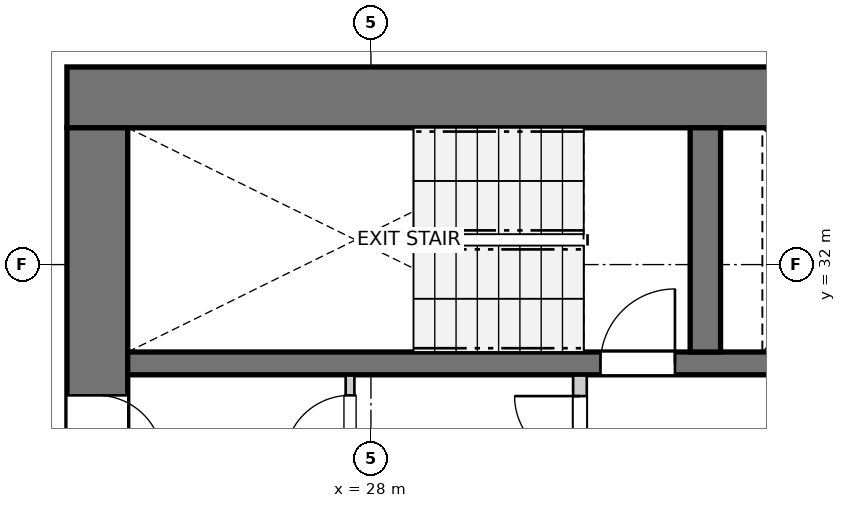
"""IFC4 building model, lengths in metres.
Left out: names, types, materials, properties, quantities, classifications, styles, units other than length and angle.
Written with IfcOpenShell. Run it as: python <this file> out.ifc"""

import sys

from ifc_helpers import new_model, si_unit, direction, frame, frame_2d, origin, place, context, subcontext, project, spatial, rectangle, extrude, source, transform, mapped, element, fill, save


model = new_model("IFC4")
c1 = context("Model", 3, precision=1e-05, world=origin(), true_north=direction((0.0, 1.0)))
c2 = subcontext(c1, "Body", "Model", "MODEL_VIEW")
j1 = project(units=[si_unit("LENGTHUNIT", "METRE"), si_unit("PLANEANGLEUNIT", "RADIAN")], contexts=[c1])
p1 = place(None, origin())
s1 = spatial("IfcSite", under=j1, at=p1, CompositionType="ELEMENT")
p2 = place(p1, origin())
s2 = spatial("IfcBuilding", under=s1, at=p2, CompositionType="ELEMENT")
p3 = place(p2, frame((0.0, 0.0, 23.8)))
s3 = spatial("IfcBuildingStorey", under=s2, at=p3, CompositionType="ELEMENT", Elevation=23.8)
p4 = place(p3, frame((36.7, 34.2, 0.0), z_axis=(0.0, 0.0, 1.0), x_axis=(-1.0, 0.0, 0.0)))
e1 = element("IfcWall", 1, at=p4, inside=s3, PredefinedType="SHEAR", context=c2, shape_type="SweptSolid", body=[
    extrude(rectangle(XDim=12.7, YDim=0.8, at=frame_2d((6.35, 0.0))), origin(), (0.0, 0.0, 1.0), 2.935),
])
p5 = place(p3, frame((24.4, 33.8, 0.0), z_axis=(0.0, 0.0, 1.0), x_axis=(0.0, -1.0, 0.0)))
e2 = element("IfcWall", 2, at=p5, inside=s3, PredefinedType="SHEAR", context=c2, shape_type="SweptSolid", body=[
    extrude(rectangle(XDim=15.6, YDim=0.8, at=frame_2d((7.8, 0.0))), origin(), (0.0, 0.0, 1.0), 2.935),
])
p6 = place(p5, frame((7.05, 0.0, 0.0)))
e3 = element("IfcOpeningElement", 3, at=p6, cuts=e2, PredefinedType="OPENING", context=c2, shape_type="SweptSolid", body=[
    extrude(rectangle(XDim=1.5, YDim=2.15, at=frame_2d((0.75, 1.075))), frame((0.0, 0.41, 0.0), z_axis=(0.0, -1.0, 0.0), x_axis=(1.0, 0.0, 0.0)), (0.0, 0.0, 1.0), 0.82),
])
p7 = place(p5, frame((3.52, 0.0, 0.0)))
e4 = element("IfcOpeningElement", 4, at=p7, cuts=e2, PredefinedType="OPENING", context=c2, shape_type="SweptSolid", body=[
    extrude(rectangle(XDim=0.86, YDim=2.05, at=frame_2d((0.43, 1.025))), frame((0.0, 0.41, 0.0), z_axis=(0.0, -1.0, 0.0), x_axis=(1.0, 0.0, 0.0)), (0.0, 0.0, 1.0), 0.82),
])
p8 = place(p5, frame((11.22, 0.0, 0.0)))
e5 = element("IfcOpeningElement", 5, at=p8, cuts=e2, PredefinedType="OPENING", context=c2, shape_type="SweptSolid", body=[
    extrude(rectangle(XDim=0.86, YDim=2.05, at=frame_2d((0.43, 1.025))), frame((0.0, 0.41, 0.0), z_axis=(0.0, -1.0, 0.0), x_axis=(1.0, 0.0, 0.0)), (0.0, 0.0, 1.0), 0.82),
])
p9 = place(p3, frame((24.8, 30.7, 0.0), z_axis=(0.0, 0.0, 1.0), x_axis=(1.0, 0.0, 0.0)))
e6 = element("IfcWall", 6, at=p9, inside=s3, PredefinedType="SHEAR", context=c2, shape_type="SweptSolid", body=[
    extrude(rectangle(XDim=11.1, YDim=0.3, at=frame_2d((5.55, 0.0))), origin(), (0.0, 0.0, 1.0), 2.935),
])
p10 = place(p9, frame((6.22, 0.0, 0.0)))
e7 = element("IfcOpeningElement", 7, at=p10, cuts=e6, PredefinedType="OPENING", context=c2, shape_type="SweptSolid", body=[
    extrude(rectangle(XDim=0.98, YDim=2.15, at=frame_2d((0.49, 1.075))), frame((0.0, 0.16, 0.0), z_axis=(0.0, -1.0, 0.0), x_axis=(1.0, 0.0, 0.0)), (0.0, 0.0, 1.0), 0.32),
])
p11 = place(p9, frame((9.15, 0.0, 0.0)))
e8 = element("IfcOpeningElement", 8, at=p11, cuts=e6, PredefinedType="OPENING", context=c2, shape_type="SweptSolid", body=[
    extrude(rectangle(XDim=1.15, YDim=2.15, at=frame_2d((0.575, 1.075))), frame((0.0, 0.16, 0.0), z_axis=(0.0, -1.0, 0.0), x_axis=(1.0, 0.0, 0.0)), (0.0, 0.0, 1.0), 0.32),
])
p12 = place(p3, frame((32.4, 30.85, 0.0), z_axis=(0.0, 0.0, 1.0), x_axis=(0.0, 1.0, 0.0)))
e9 = element("IfcWall", 9, at=p12, inside=s3, PredefinedType="SHEAR", context=c2, shape_type="SweptSolid", body=[
    extrude(rectangle(XDim=2.95, YDim=0.4, at=frame_2d((1.475, 0.0))), origin(), (0.0, 0.0, 1.0), 2.935),
])
p13 = place(p3, frame((30.75, 27.43, 0.0), z_axis=(0.0, 0.0, 1.0), x_axis=(0.0, 1.0, 0.0)))
e10 = element("IfcWall", 10, at=p13, inside=s3, PredefinedType="PARTITIONING", context=c2, shape_type="SweptSolid", body=[
    extrude(rectangle(XDim=3.11, YDim=0.18, at=frame_2d((1.555, 0.0))), origin(), (0.0, 0.0, 1.0), 2.935),
])
p14 = place(p13, frame((1.98, 0.0, 0.0)))
e11 = element("IfcOpeningElement", 11, at=p14, cuts=e10, PredefinedType="OPENING", context=c2, shape_type="SweptSolid", body=[
    extrude(rectangle(XDim=0.86, YDim=2.05, at=frame_2d((0.43, 1.025))), frame((0.0, 0.1, 0.0), z_axis=(0.0, -1.0, 0.0), x_axis=(1.0, 0.0, 0.0)), (0.0, 0.0, 1.0), 0.2),
])
p15 = place(p3, frame((27.725, 29.16, 0.0), z_axis=(0.0, 0.0, 1.0), x_axis=(0.0, 1.0, 0.0)))
e12 = element("IfcWall", 12, at=p15, inside=s3, PredefinedType="PARTITIONING", context=c2, shape_type="SweptSolid", body=[
    extrude(rectangle(XDim=1.38, YDim=0.115, at=frame_2d((0.69, 0.0))), origin(), (0.0, 0.0, 1.0), 2.935),
])
p16 = place(p15, frame((0.26, 0.0, 0.0)))
e13 = element("IfcOpeningElement", 13, at=p16, cuts=e12, PredefinedType="OPENING", context=c2, shape_type="SweptSolid", body=[
    extrude(rectangle(XDim=0.86, YDim=2.05, at=frame_2d((0.43, 1.025))), frame((0.0, 0.067, 0.0), z_axis=(0.0, -1.0, 0.0), x_axis=(1.0, 0.0, 0.0)), (0.0, 0.0, 1.0), 0.135),
])
m1 = source(origin(), c2, "Body", "SweptSolid", [
    extrude(rectangle(XDim=0.98, YDim=2.15, at=frame_2d((0.49, 1.075))), frame((0.0, 0.025, 0.0), z_axis=(0.0, -1.0, 0.0), x_axis=(1.0, 0.0, 0.0)), (0.0, 0.0, 1.0), 0.05),
])
p17 = place(p10, origin())
e14 = element("IfcDoor", 14, at=p17, inside=s3, OperationType="SINGLE_SWING_RIGHT", PredefinedType="DOOR", context=c2, shape_type="MappedRepresentation", body=[
    mapped(m1, transform((0.0, 0.0, 0.0), x_axis=(1.0, 0.0, 0.0), y_axis=(0.0, 1.0, 0.0), z_axis=(0.0, 0.0, 1.0), scale=1.0)),
])
fill(e7, e14)
m2 = source(origin(), c2, "Body", "SweptSolid", [
    extrude(rectangle(XDim=0.86, YDim=2.05, at=frame_2d((0.43, 1.025))), frame((0.0, 0.025, 0.0), z_axis=(0.0, -1.0, 0.0), x_axis=(1.0, 0.0, 0.0)), (0.0, 0.0, 1.0), 0.05),
])
p18 = place(p7, origin())
e15 = element("IfcDoor", 15, at=p18, inside=s3, OperationType="SINGLE_SWING_RIGHT", PredefinedType="DOOR", context=c2, shape_type="MappedRepresentation", body=[
    mapped(m2, transform((0.0, 0.0, 0.0), x_axis=(1.0, 0.0, 0.0), y_axis=(0.0, 1.0, 0.0), z_axis=(0.0, 0.0, 1.0), scale=1.0)),
])
fill(e4, e15)
p19 = place(p14, origin())
e16 = element("IfcDoor", 16, at=p19, inside=s3, OperationType="SINGLE_SWING_RIGHT", PredefinedType="DOOR", context=c2, shape_type="MappedRepresentation", body=[
    mapped(m2, transform((0.0, 0.0, 0.0), x_axis=(1.0, 0.0, 0.0), y_axis=(0.0, 1.0, 0.0), z_axis=(0.0, 0.0, 1.0), scale=1.0)),
])
fill(e11, e16)
p20 = place(p16, origin())
e17 = element("IfcDoor", 17, at=p20, inside=s3, OperationType="SINGLE_SWING_LEFT", PredefinedType="DOOR", context=c2, shape_type="MappedRepresentation", body=[
    mapped(m2, transform((0.0, 0.0, 0.0), x_axis=(1.0, 0.0, 0.0), y_axis=(0.0, 1.0, 0.0), z_axis=(0.0, 0.0, 1.0), scale=1.0)),
])
fill(e13, e17)
save(model, sys.argv[1])
